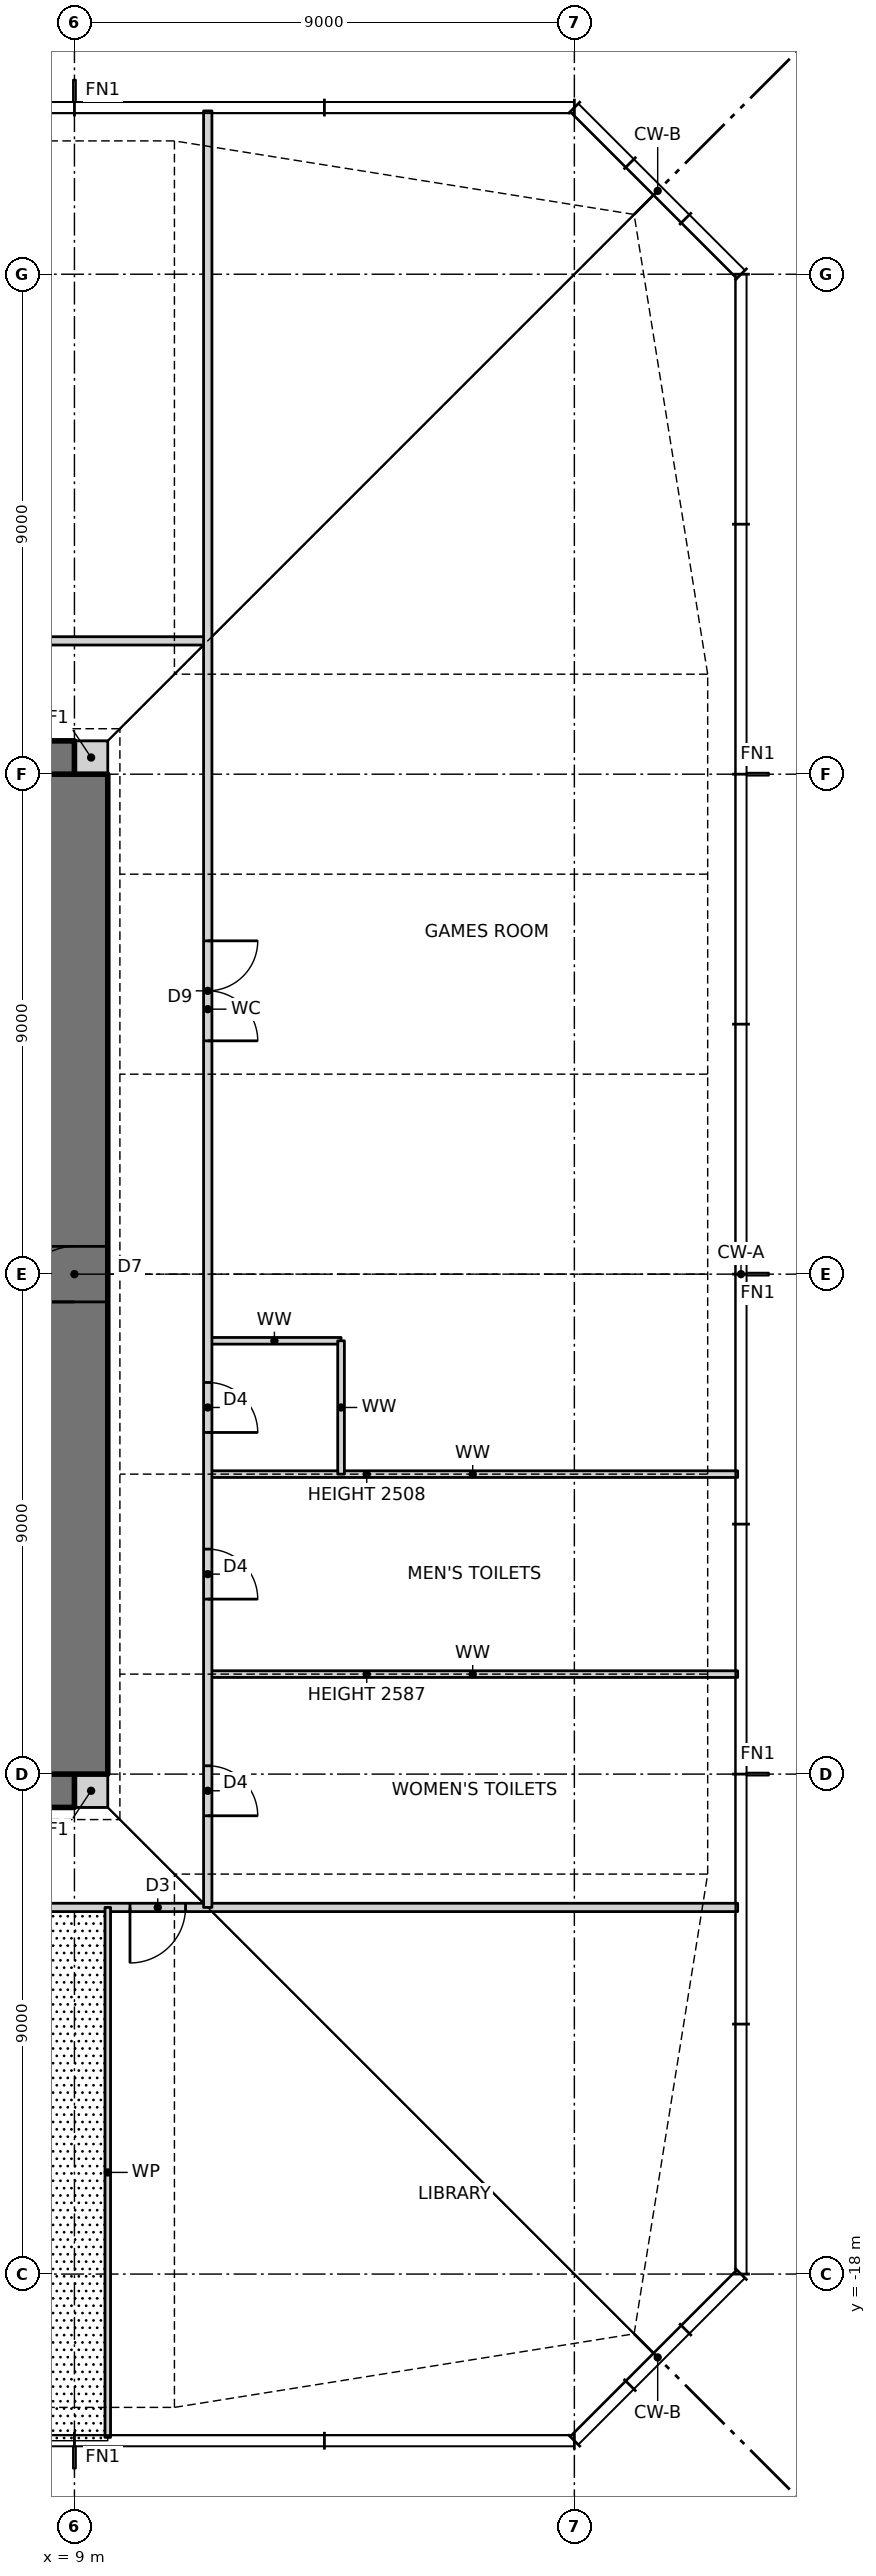
"""IFC4 building model, lengths in metres.
Left out: names, types, materials, properties, quantities, classifications, styles, units other than length and angle.
Written with IfcOpenShell. Run it as: python <this file> out.ifc"""

import sys

from ifc_helpers import new_model, si_unit, direction, frame, frame_2d, origin, place, context, subcontext, project, spatial, rectangle, extrude, element, fill, save


model = new_model("IFC4")
c1 = context("Model", 3, precision=1e-05, world=origin(), true_north=direction((0.0, 1.0)))
c2 = subcontext(c1, "Body", "Model", "MODEL_VIEW")
j1 = project(units=[si_unit("LENGTHUNIT", "METRE"), si_unit("PLANEANGLEUNIT", "RADIAN")], contexts=[c1])
p1 = place(None, origin())
s1 = spatial("IfcSite", under=j1, at=p1, CompositionType="ELEMENT")
p2 = place(p1, origin())
s2 = spatial("IfcBuilding", under=s1, at=p2, CompositionType="ELEMENT")
p3 = place(p2, frame((0.0, 0.0, 80.5)))
s3 = spatial("IfcBuildingStorey", under=s2, at=p3, CompositionType="ELEMENT", Elevation=80.5)
for number, where, z_axis, x_axis in (
    (1, (9.0, -9.3, 0.0), (0.0, 0.0, 1.0), (1.0, 0.0, 0.0)),
    (2, (9.0, 9.3, 0.0), (0.0, 0.0, 1.0), (1.0, 0.0, 0.0)),
):
    element("IfcWall", number, at=place(p3, frame(where, z_axis=z_axis, x_axis=x_axis)), inside=s3, PredefinedType="SOLIDWALL", context=c2, shape_type="SweptSolid", body=[
        extrude(rectangle(XDim=0.6, YDim=0.6, at=frame_2d((0.3, 0.0))), origin(), (0.0, 0.0, 1.0), 3.5),
    ])
p4 = place(p3, frame((-9.0, -9.0, 0.0), z_axis=(0.0, 0.0, 1.0), x_axis=(1.0, 0.0, 0.0)))
e3 = element("IfcWall", 3, at=p4, inside=s3, PredefinedType="SHEAR", context=c2, shape_type="SweptSolid", body=[
    extrude(rectangle(XDim=18.0, YDim=1.2, at=frame_2d((9.0, 0.0))), origin(), (0.0, 0.0, 1.0), 3.5),
])
p5 = place(p4, frame((3.775, 0.0, 0.0)))
e4 = element("IfcOpeningElement", 4, at=p5, cuts=e3, PredefinedType="OPENING", context=c2, shape_type="SweptSolid", body=[
    extrude(rectangle(XDim=0.9, YDim=2.1, at=frame_2d((0.45, 1.05))), frame((0.0, 0.61, 0.0), z_axis=(0.0, -1.0, 0.0), x_axis=(1.0, 0.0, 0.0)), (0.0, 0.0, 1.0), 1.22),
])
p6 = place(p4, frame((10.625, 0.0, 0.0)))
e5 = element("IfcOpeningElement", 5, at=p6, cuts=e3, PredefinedType="OPENING", context=c2, shape_type="SweptSolid", body=[
    extrude(rectangle(XDim=0.9, YDim=2.1, at=frame_2d((0.45, 1.05))), frame((0.0, 0.61, 0.0), z_axis=(0.0, -1.0, 0.0), x_axis=(1.0, 0.0, 0.0)), (0.0, 0.0, 1.0), 1.22),
])
p7 = place(p3, frame((9.0, 9.0, 0.0), z_axis=(0.0, 0.0, 1.0), x_axis=(-1.0, 0.0, 0.0)))
e6 = element("IfcWall", 6, at=p7, inside=s3, PredefinedType="SHEAR", context=c2, shape_type="SweptSolid", body=[
    extrude(rectangle(XDim=18.0, YDim=1.2, at=frame_2d((9.0, 0.0))), origin(), (0.0, 0.0, 1.0), 3.5),
])
p8 = place(p7, frame((11.125, 0.0, 0.0)))
e7 = element("IfcOpeningElement", 7, at=p8, cuts=e6, PredefinedType="OPENING", context=c2, shape_type="SweptSolid", body=[
    extrude(rectangle(XDim=0.9, YDim=2.1, at=frame_2d((0.45, 1.05))), frame((0.0, 0.61, 0.0), z_axis=(0.0, -1.0, 0.0), x_axis=(1.0, 0.0, 0.0)), (0.0, 0.0, 1.0), 1.22),
])
p9 = place(p7, frame((4.275, 0.0, 0.0)))
e8 = element("IfcOpeningElement", 8, at=p9, cuts=e6, PredefinedType="OPENING", context=c2, shape_type="SweptSolid", body=[
    extrude(rectangle(XDim=0.9, YDim=2.1, at=frame_2d((0.45, 1.05))), frame((0.0, 0.61, 0.0), z_axis=(0.0, -1.0, 0.0), x_axis=(1.0, 0.0, 0.0)), (0.0, 0.0, 1.0), 1.22),
])
p10 = place(p3, frame((9.0, -9.0, 0.0), z_axis=(0.0, 0.0, 1.0), x_axis=(0.0, 1.0, 0.0)))
e9 = element("IfcWall", 9, at=p10, inside=s3, PredefinedType="SHEAR", context=c2, shape_type="SweptSolid", body=[
    extrude(rectangle(XDim=18.0, YDim=1.2, at=frame_2d((9.0, 0.0))), origin(), (0.0, 0.0, 1.0), 3.5),
])
p11 = place(p10, frame((8.5, 0.0, 0.0)))
e10 = element("IfcOpeningElement", 10, at=p11, cuts=e9, PredefinedType="OPENING", context=c2, shape_type="SweptSolid", body=[
    extrude(rectangle(XDim=1.0, YDim=2.1, at=frame_2d((0.5, 1.05))), frame((0.0, 0.61, 0.0), z_axis=(0.0, -1.0, 0.0), x_axis=(1.0, 0.0, 0.0)), (0.0, 0.0, 1.0), 1.22),
])
p12 = place(p3, frame((-11.4, -11.4, 0.0), z_axis=(0.0, 0.0, 1.0), x_axis=(1.0, 0.0, 0.0)))
e11 = element("IfcWall", 11, at=p12, inside=s3, PredefinedType="PARTITIONING", context=c2, shape_type="SweptSolid", body=[
    extrude(rectangle(XDim=32.34, YDim=0.15, at=frame_2d((16.17, 0.0))), origin(), (0.0, 0.0, 1.0), 3.27),
])
p13 = place(p12, frame((9.6, 0.0, 0.0)))
e12 = element("IfcOpeningElement", 12, at=p13, cuts=e11, PredefinedType="OPENING", context=c2, shape_type="SweptSolid", body=[
    extrude(rectangle(XDim=1.8, YDim=2.1, at=frame_2d((0.9, 1.05))), frame((0.0, 0.085, 0.0), z_axis=(0.0, -1.0, 0.0), x_axis=(1.0, 0.0, 0.0)), (0.0, 0.0, 1.0), 0.17),
])
p14 = place(p12, frame((21.4, 0.0, 0.0)))
e13 = element("IfcOpeningElement", 13, at=p14, cuts=e11, PredefinedType="OPENING", context=c2, shape_type="SweptSolid", body=[
    extrude(rectangle(XDim=1.0, YDim=2.1, at=frame_2d((0.5, 1.05))), frame((0.0, 0.085, 0.0), z_axis=(0.0, -1.0, 0.0), x_axis=(1.0, 0.0, 0.0)), (0.0, 0.0, 1.0), 0.17),
])
p15 = place(p3, frame((11.4, -7.2, 0.0), z_axis=(0.0, 0.0, 1.0), x_axis=(1.0, 0.0, 0.0)))
e14 = element("IfcWall", 14, at=p15, inside=s3, PredefinedType="PARTITIONING", context=c2, shape_type="SweptSolid", body=[
    extrude(rectangle(XDim=9.54, YDim=0.12, at=frame_2d((4.77, 0.0))), origin(), (0.0, 0.0, 1.0), 2.587),
])
p16 = place(p3, frame((11.4, -3.6, 0.0), z_axis=(0.0, 0.0, 1.0), x_axis=(1.0, 0.0, 0.0)))
e15 = element("IfcWall", 15, at=p16, inside=s3, PredefinedType="PARTITIONING", context=c2, shape_type="SweptSolid", body=[
    extrude(rectangle(XDim=9.54, YDim=0.12, at=frame_2d((4.77, 0.0))), origin(), (0.0, 0.0, 1.0), 2.508),
])
p17 = place(p3, frame((11.4, -1.2, 0.0), z_axis=(0.0, 0.0, 1.0), x_axis=(1.0, 0.0, 0.0)))
e16 = element("IfcWall", 16, at=p17, inside=s3, PredefinedType="PARTITIONING", context=c2, shape_type="SweptSolid", body=[
    extrude(rectangle(XDim=2.4, YDim=0.12, at=frame_2d((1.2, 0.0))), origin(), (0.0, 0.0, 1.0), 3.27),
])
p18 = place(p3, frame((-20.94, 11.4, 0.0), z_axis=(0.0, 0.0, 1.0), x_axis=(1.0, 0.0, 0.0)))
e17 = element("IfcWall", 17, at=p18, inside=s3, PredefinedType="PARTITIONING", context=c2, shape_type="SweptSolid", body=[
    extrude(rectangle(XDim=32.34, YDim=0.15, at=frame_2d((16.17, 0.0))), origin(), (0.0, 0.0, 1.0), 3.27),
])
p19 = place(p18, frame((23.44, 0.0, 0.0)))
e18 = element("IfcOpeningElement", 18, at=p19, cuts=e17, PredefinedType="OPENING", context=c2, shape_type="SweptSolid", body=[
    extrude(rectangle(XDim=1.8, YDim=2.1, at=frame_2d((0.9, 1.05))), frame((0.0, 0.085, 0.0), z_axis=(0.0, -1.0, 0.0), x_axis=(1.0, 0.0, 0.0)), (0.0, 0.0, 1.0), 0.17),
])
p20 = place(p18, frame((12.04, 0.0, 0.0)))
e19 = element("IfcOpeningElement", 19, at=p20, cuts=e17, PredefinedType="OPENING", context=c2, shape_type="SweptSolid", body=[
    extrude(rectangle(XDim=1.8, YDim=2.1, at=frame_2d((0.9, 1.05))), frame((0.0, 0.085, 0.0), z_axis=(0.0, -1.0, 0.0), x_axis=(1.0, 0.0, 0.0)), (0.0, 0.0, 1.0), 0.17),
])
p21 = place(p3, frame((13.8, -3.6, 0.0), z_axis=(0.0, 0.0, 1.0), x_axis=(0.0, 1.0, 0.0)))
e20 = element("IfcWall", 20, at=p21, inside=s3, PredefinedType="PARTITIONING", context=c2, shape_type="SweptSolid", body=[
    extrude(rectangle(XDim=2.4, YDim=0.12, at=frame_2d((1.2, 0.0))), origin(), (0.0, 0.0, 1.0), 3.27),
])
p22 = place(p3, frame((11.4, -11.4, 0.0), z_axis=(0.0, 0.0, 1.0), x_axis=(0.0, 1.0, 0.0)))
e21 = element("IfcWall", 21, at=p22, inside=s3, PredefinedType="PARTITIONING", context=c2, shape_type="SweptSolid", body=[
    extrude(rectangle(XDim=32.34, YDim=0.15, at=frame_2d((16.17, 0.0))), origin(), (0.0, 0.0, 1.0), 3.27),
])
p23 = place(p22, frame((1.65, 0.0, 0.0)))
e22 = element("IfcOpeningElement", 22, at=p23, cuts=e21, PredefinedType="OPENING", context=c2, shape_type="SweptSolid", body=[
    extrude(rectangle(XDim=0.9, YDim=2.1, at=frame_2d((0.45, 1.05))), frame((0.0, 0.085, 0.0), z_axis=(0.0, -1.0, 0.0), x_axis=(1.0, 0.0, 0.0)), (0.0, 0.0, 1.0), 0.17),
])
p24 = place(p22, frame((5.55, 0.0, 0.0)))
e23 = element("IfcOpeningElement", 23, at=p24, cuts=e21, PredefinedType="OPENING", context=c2, shape_type="SweptSolid", body=[
    extrude(rectangle(XDim=0.9, YDim=2.1, at=frame_2d((0.45, 1.05))), frame((0.0, 0.085, 0.0), z_axis=(0.0, -1.0, 0.0), x_axis=(1.0, 0.0, 0.0)), (0.0, 0.0, 1.0), 0.17),
])
p25 = place(p22, frame((8.55, 0.0, 0.0)))
e24 = element("IfcOpeningElement", 24, at=p25, cuts=e21, PredefinedType="OPENING", context=c2, shape_type="SweptSolid", body=[
    extrude(rectangle(XDim=0.9, YDim=2.1, at=frame_2d((0.45, 1.05))), frame((0.0, 0.085, 0.0), z_axis=(0.0, -1.0, 0.0), x_axis=(1.0, 0.0, 0.0)), (0.0, 0.0, 1.0), 0.17),
])
p26 = place(p22, frame((15.6, 0.0, 0.0)))
e25 = element("IfcOpeningElement", 25, at=p26, cuts=e21, PredefinedType="OPENING", context=c2, shape_type="SweptSolid", body=[
    extrude(rectangle(XDim=1.8, YDim=2.1, at=frame_2d((0.9, 1.05))), frame((0.0, 0.085, 0.0), z_axis=(0.0, -1.0, 0.0), x_axis=(1.0, 0.0, 0.0)), (0.0, 0.0, 1.0), 0.17),
])
p27 = place(p3, frame((9.6, -20.94, 0.0), z_axis=(0.0, 0.0, 1.0), x_axis=(0.0, 1.0, 0.0)))
e26 = element("IfcWall", 26, at=p27, inside=s3, PredefinedType="PARTITIONING", context=c2, shape_type="SweptSolid", body=[
    extrude(rectangle(XDim=9.54, YDim=0.1, at=frame_2d((4.77, 0.0))), origin(), (0.0, 0.0, 1.0), 3.27),
])
p28 = place(p14, frame((1.0, 0.0, 0.0), z_axis=(0.0, 0.0, 1.0), x_axis=(-1.0, 0.0, 0.0)))
e27 = element("IfcDoor", 27, at=p28, inside=s3, OperationType="SINGLE_SWING_RIGHT", PredefinedType="DOOR", context=c2, shape_type="SweptSolid", body=[
    extrude(rectangle(XDim=1.0, YDim=2.1, at=frame_2d((0.5, 1.05))), frame((0.0, 0.025, 0.0), z_axis=(0.0, -1.0, 0.0), x_axis=(1.0, 0.0, 0.0)), (0.0, 0.0, 1.0), 0.05),
])
fill(e13, e27)
p29 = place(p23, frame((0.9, 0.0, 0.0), z_axis=(0.0, 0.0, 1.0), x_axis=(-1.0, 0.0, 0.0)))
e28 = element("IfcDoor", 28, at=p29, inside=s3, OperationType="SINGLE_SWING_RIGHT", PredefinedType="DOOR", context=c2, shape_type="SweptSolid", body=[
    extrude(rectangle(XDim=0.9, YDim=2.1, at=frame_2d((0.45, 1.05))), frame((0.0, 0.025, 0.0), z_axis=(0.0, -1.0, 0.0), x_axis=(1.0, 0.0, 0.0)), (0.0, 0.0, 1.0), 0.05),
])
fill(e22, e28)
p30 = place(p24, frame((0.9, 0.0, 0.0), z_axis=(0.0, 0.0, 1.0), x_axis=(-1.0, 0.0, 0.0)))
e29 = element("IfcDoor", 29, at=p30, inside=s3, OperationType="SINGLE_SWING_RIGHT", PredefinedType="DOOR", context=c2, shape_type="SweptSolid", body=[
    extrude(rectangle(XDim=0.9, YDim=2.1, at=frame_2d((0.45, 1.05))), frame((0.0, 0.025, 0.0), z_axis=(0.0, -1.0, 0.0), x_axis=(1.0, 0.0, 0.0)), (0.0, 0.0, 1.0), 0.05),
])
fill(e23, e29)
p31 = place(p25, frame((0.9, 0.0, 0.0), z_axis=(0.0, 0.0, 1.0), x_axis=(-1.0, 0.0, 0.0)))
e30 = element("IfcDoor", 30, at=p31, inside=s3, OperationType="SINGLE_SWING_RIGHT", PredefinedType="DOOR", context=c2, shape_type="SweptSolid", body=[
    extrude(rectangle(XDim=0.9, YDim=2.1, at=frame_2d((0.45, 1.05))), frame((0.0, 0.025, 0.0), z_axis=(0.0, -1.0, 0.0), x_axis=(1.0, 0.0, 0.0)), (0.0, 0.0, 1.0), 0.05),
])
fill(e24, e30)
p32 = place(p26, frame((1.8, 0.0, 0.0), z_axis=(0.0, 0.0, 1.0), x_axis=(-1.0, 0.0, 0.0)))
e31 = element("IfcDoor", 31, at=p32, inside=s3, OperationType="DOUBLE_DOOR_SINGLE_SWING", PredefinedType="DOOR", context=c2, shape_type="SweptSolid", body=[
    extrude(rectangle(XDim=1.8, YDim=2.1, at=frame_2d((0.9, 1.05))), frame((0.0, 0.025, 0.0), z_axis=(0.0, -1.0, 0.0), x_axis=(1.0, 0.0, 0.0)), (0.0, 0.0, 1.0), 0.05),
])
fill(e25, e31)
p33 = place(p11, origin())
e32 = element("IfcDoor", 32, at=p33, inside=s3, OperationType="SINGLE_SWING_LEFT", PredefinedType="DOOR", context=c2, shape_type="SweptSolid", body=[
    extrude(rectangle(XDim=1.0, YDim=2.1, at=frame_2d((0.5, 1.05))), frame((0.0, 0.025, 0.0), z_axis=(0.0, -1.0, 0.0), x_axis=(1.0, 0.0, 0.0)), (0.0, 0.0, 1.0), 0.05),
])
fill(e10, e32)
save(model, sys.argv[1])
